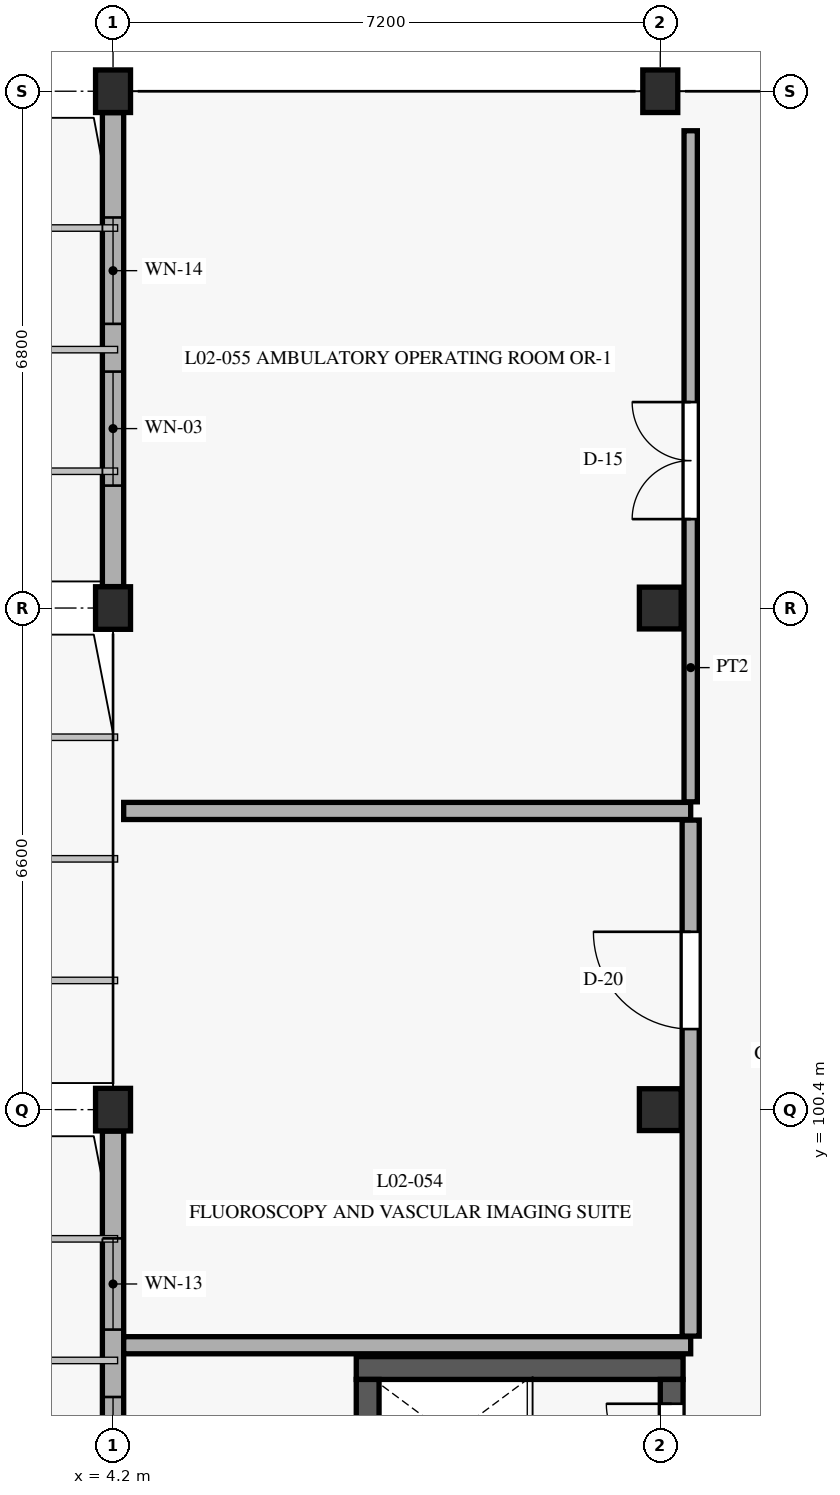
"""IFC4 building model, lengths in metres.
Left out: names, types, materials, properties, quantities, classifications, styles, units other than length and angle.
Written with IfcOpenShell. Run it as: python <this file> out.ifc"""

import sys

from ifc_helpers import new_model, si_unit, direction, frame, frame_2d, origin, origin_with_axes, origin_2d, place, context, subcontext, project, spatial, rectangle, extrude, element, fill, save


model = new_model("IFC4")
c1 = context("Model", 3, precision=1e-05, world=origin(), true_north=direction((0.0, 1.0)))
c2 = subcontext(c1, "Body", "Model", "MODEL_VIEW")
j1 = project(units=[si_unit("LENGTHUNIT", "METRE"), si_unit("PLANEANGLEUNIT", "RADIAN")], contexts=[c1])
p1 = place(None, origin())
s1 = spatial("IfcSite", under=j1, at=p1, CompositionType="ELEMENT")
p2 = place(p1, origin())
s2 = spatial("IfcBuilding", under=s1, at=p2, CompositionType="ELEMENT")
p3 = place(p2, frame((0.0, 0.0, 4.8)))
s3 = spatial("IfcBuildingStorey", under=s2, at=p3, CompositionType="ELEMENT", Elevation=4.8)
for number, where, z_axis, x_axis in (
    (1, (4.2, 100.4, 0.0), (0.0, 0.0, 1.0), (1.0, 0.0, 0.0)),
    (2, (4.2, 107.0, 0.0), (0.0, 0.0, 1.0), (1.0, 0.0, 0.0)),
    (3, (4.2, 113.8, 0.0), (0.0, 0.0, 1.0), (1.0, 0.0, 0.0)),
):
    element("IfcColumn", number, at=place(p3, frame(where, z_axis=z_axis, x_axis=x_axis)), inside=s3, PredefinedType="COLUMN", context=c2, shape_type="SweptSolid", body=[
        extrude(rectangle(XDim=0.46, YDim=0.56, at=origin_2d()), origin(), (0.0, 0.0, 1.0), 4.5),
    ])
for number, where, z_axis, x_axis in (
    (4, (11.4, 100.4, 0.0), (0.0, 0.0, 1.0), (1.0, 0.0, 0.0)),
    (5, (11.4, 107.0, 0.0), (0.0, 0.0, 1.0), (1.0, 0.0, 0.0)),
):
    element("IfcColumn", number, at=place(p3, frame(where, z_axis=z_axis, x_axis=x_axis)), inside=s3, PredefinedType="COLUMN", context=c2, shape_type="SweptSolid", body=[
        extrude(rectangle(XDim=0.55, YDim=0.55, at=origin_2d()), origin(), (0.0, 0.0, 1.0), 4.5),
    ])
p4 = place(p3, frame((11.4, 113.8, 0.0), z_axis=(0.0, 0.0, 1.0), x_axis=(1.0, 0.0, 0.0)))
e6 = element("IfcColumn", 6, at=p4, inside=s3, PredefinedType="COLUMN", context=c2, shape_type="SweptSolid", body=[
    extrude(rectangle(XDim=0.46, YDim=0.56, at=origin_2d()), origin(), (0.0, 0.0, 1.0), 4.5),
])
p5 = place(p3, frame((11.7, 97.0, 0.0), z_axis=(0.0, 0.0, 1.0), x_axis=(-1.0, 0.0, 0.0)))
e7 = element("IfcWall", 7, at=p5, inside=s3, PredefinedType="SHEAR", context=c2, shape_type="SweptSolid", body=[
    extrude(rectangle(XDim=4.3, YDim=0.3, at=frame_2d((2.15, 0.0))), origin(), (0.0, 0.0, 1.0), 4.2),
])
p6 = place(p3, frame((7.55, 96.85, 0.0), z_axis=(0.0, 0.0, 1.0), x_axis=(0.0, -1.0, 0.0)))
e8 = element("IfcWall", 8, at=p6, inside=s3, PredefinedType="SHEAR", context=c2, shape_type="SweptSolid", body=[
    extrude(rectangle(XDim=8.7, YDim=0.3, at=frame_2d((4.35, 0.0))), origin(), (0.0, 0.0, 1.0), 4.2),
])
p7 = place(p3, frame((11.55, 88.15, 0.0), z_axis=(0.0, 0.0, 1.0), x_axis=(0.0, 1.0, 0.0)))
e9 = element("IfcWall", 9, at=p7, inside=s3, PredefinedType="SHEAR", context=c2, shape_type="SweptSolid", body=[
    extrude(rectangle(XDim=8.7, YDim=0.3, at=frame_2d((4.35, 0.0))), origin(), (0.0, 0.0, 1.0), 4.2),
])
p8 = place(p7, frame((0.2, 0.0, 0.0)))
e10 = element("IfcOpeningElement", 10, at=p8, cuts=e9, PredefinedType="OPENING", context=c2, shape_type="SweptSolid", body=[
    extrude(rectangle(XDim=1.1, YDim=2.2, at=frame_2d((0.55, 1.1))), frame((0.0, 0.16, 0.0), z_axis=(0.0, -1.0, 0.0), x_axis=(1.0, 0.0, 0.0)), (0.0, 0.0, 1.0), 0.32),
])
p9 = place(p7, frame((7.52, 0.0, 0.0)))
e11 = element("IfcOpeningElement", 11, at=p9, cuts=e9, PredefinedType="OPENING", context=c2, shape_type="SweptSolid", body=[
    extrude(rectangle(XDim=0.86, YDim=2.05, at=frame_2d((0.43, 1.025))), frame((0.0, 0.16, 0.0), z_axis=(0.0, -1.0, 0.0), x_axis=(1.0, 0.0, 0.0)), (0.0, 0.0, 1.0), 0.32),
])
p10 = place(p3, frame((4.2, 100.118, 0.0), z_axis=(0.0, 0.0, 1.0), x_axis=(0.0, -1.0, 0.0)))
e12 = element("IfcWall", 12, at=p10, inside=s3, PredefinedType="SOLIDWALL", context=c2, shape_type="SweptSolid", body=[
    extrude(rectangle(XDim=6.036, YDim=0.28, at=frame_2d((3.018, 0.0))), origin(), (0.0, 0.0, 1.0), 3.65),
])
p11 = place(p10, frame((1.412, 0.0, 0.88)))
e13 = element("IfcOpeningElement", 13, at=p11, cuts=e12, PredefinedType="OPENING", context=c2, shape_type="SweptSolid", body=[
    extrude(rectangle(XDim=1.2, YDim=2.05, at=frame_2d((0.6, 1.025))), frame((0.0, 0.15, 0.0), z_axis=(0.0, -1.0, 0.0), x_axis=(1.0, 0.0, 0.0)), (0.0, 0.0, 1.0), 0.3),
])
p12 = place(p10, frame((3.499, 0.0, 0.88)))
e14 = element("IfcOpeningElement", 14, at=p12, cuts=e12, PredefinedType="OPENING", context=c2, shape_type="SweptSolid", body=[
    extrude(rectangle(XDim=1.05, YDim=2.2, at=frame_2d((0.525, 1.1))), frame((0.0, 0.15, 0.0), z_axis=(0.0, -1.0, 0.0), x_axis=(1.0, 0.0, 0.0)), (0.0, 0.0, 1.0), 0.3),
])
p13 = place(p3, frame((4.2, 113.518, 0.0), z_axis=(0.0, 0.0, 1.0), x_axis=(0.0, -1.0, 0.0)))
e15 = element("IfcWall", 15, at=p13, inside=s3, PredefinedType="SOLIDWALL", context=c2, shape_type="SweptSolid", body=[
    extrude(rectangle(XDim=6.236, YDim=0.28, at=frame_2d((3.118, 0.0))), origin(), (0.0, 0.0, 1.0), 3.65),
])
p14 = place(p13, frame((1.379, 0.0, 0.88)))
e16 = element("IfcOpeningElement", 16, at=p14, cuts=e15, PredefinedType="OPENING", context=c2, shape_type="SweptSolid", body=[
    extrude(rectangle(XDim=1.4, YDim=2.05, at=frame_2d((0.7, 1.025))), frame((0.0, 0.15, 0.0), z_axis=(0.0, -1.0, 0.0), x_axis=(1.0, 0.0, 0.0)), (0.0, 0.0, 1.0), 0.3),
])
p15 = place(p13, frame((3.407, 0.0, 0.88)))
e17 = element("IfcOpeningElement", 17, at=p15, cuts=e15, PredefinedType="OPENING", context=c2, shape_type="SweptSolid", body=[
    extrude(rectangle(XDim=1.5, YDim=2.2, at=frame_2d((0.75, 1.1))), frame((0.0, 0.15, 0.0), z_axis=(0.0, -1.0, 0.0), x_axis=(1.0, 0.0, 0.0)), (0.0, 0.0, 1.0), 0.3),
])
p16 = place(p3, frame((11.8, 97.42, 0.0), z_axis=(0.0, 0.0, 1.0), x_axis=(0.0, 1.0, 0.0)))
e18 = element("IfcWall", 18, at=p16, inside=s3, PredefinedType="SOLIDWALL", context=c2, shape_type="SweptSolid", body=[
    extrude(rectangle(XDim=6.79, YDim=0.225, at=frame_2d((3.395, 0.0))), origin(), (0.0, 0.0, 1.0), 3.795),
])
p17 = place(p16, frame((4.04, 0.0, 0.0)))
e19 = element("IfcOpeningElement", 19, at=p17, cuts=e18, PredefinedType="OPENING", context=c2, shape_type="SweptSolid", body=[
    extrude(rectangle(XDim=1.28, YDim=2.25, at=frame_2d((0.64, 1.125))), frame((0.0, 0.123, 0.0), z_axis=(0.0, -1.0, 0.0), x_axis=(1.0, 0.0, 0.0)), (0.0, 0.0, 1.0), 0.245),
])
for number, where, z_axis, x_axis in (
    (20, (4.34, 104.33, 0.0), (0.0, 0.0, 1.0), (1.0, 0.0, 0.0)),
    (21, (4.34, 97.3, 0.0), (0.0, 0.0, 1.0), (1.0, 0.0, 0.0)),
):
    element("IfcWall", number, at=place(p3, frame(where, z_axis=z_axis, x_axis=x_axis)), inside=s3, PredefinedType="SOLIDWALL", context=c2, shape_type="SweptSolid", body=[
        extrude(rectangle(XDim=7.46, YDim=0.225, at=frame_2d((3.73, 0.0))), origin(), (0.0, 0.0, 1.0), 3.645),
    ])
p18 = place(p3, frame((11.8, 104.45, 0.0), z_axis=(0.0, 0.0, 1.0), x_axis=(0.0, 1.0, 0.0)))
e22 = element("IfcWall", 22, at=p18, inside=s3, PredefinedType="PARTITIONING", context=c2, shape_type="SweptSolid", body=[
    extrude(rectangle(XDim=8.83, YDim=0.175, at=frame_2d((4.415, 0.0))), origin(), (0.0, 0.0, 1.0), 3.795),
])
p19 = place(p18, frame((3.72, 0.0, 0.0)))
e23 = element("IfcOpeningElement", 23, at=p19, cuts=e22, PredefinedType="OPENING", context=c2, shape_type="SweptSolid", body=[
    extrude(rectangle(XDim=1.54, YDim=2.35, at=frame_2d((0.77, 1.175))), frame((0.0, 0.098, 0.0), z_axis=(0.0, -1.0, 0.0), x_axis=(1.0, 0.0, 0.0)), (0.0, 0.0, 1.0), 0.195),
])
p20 = place(p9, origin_with_axes())
e24 = element("IfcDoor", 24, at=p20, inside=s3, OperationType="SINGLE_SWING_RIGHT", PredefinedType="DOOR", context=c2, shape_type="SweptSolid", body=[
    extrude(rectangle(XDim=0.86, YDim=2.05, at=frame_2d((0.43, 1.025))), frame((0.0, 0.025, 0.0), z_axis=(0.0, -1.0, 0.0), x_axis=(1.0, 0.0, 0.0)), (0.0, 0.0, 1.0), 0.05),
])
fill(e11, e24)
p21 = place(p11, origin_with_axes())
e25 = element("IfcWindow", 25, at=p21, inside=s3, PartitioningType="SINGLE_PANEL", PredefinedType="WINDOW", context=c2, shape_type="SweptSolid", body=[
    extrude(rectangle(XDim=1.2, YDim=2.05, at=frame_2d((0.6, 1.025))), frame((0.0, 0.03, 0.0), z_axis=(0.0, -1.0, 0.0), x_axis=(1.0, 0.0, 0.0)), (0.0, 0.0, 1.0), 0.06),
])
fill(e13, e25)
p22 = place(p12, origin_with_axes())
e26 = element("IfcWindow", 26, at=p22, inside=s3, PartitioningType="SINGLE_PANEL", PredefinedType="WINDOW", context=c2, shape_type="SweptSolid", body=[
    extrude(rectangle(XDim=1.05, YDim=2.2, at=frame_2d((0.525, 1.1))), frame((0.0, 0.03, 0.0), z_axis=(0.0, -1.0, 0.0), x_axis=(1.0, 0.0, 0.0)), (0.0, 0.0, 1.0), 0.06),
])
fill(e14, e26)
p23 = place(p14, origin_with_axes())
e27 = element("IfcWindow", 27, at=p23, inside=s3, PartitioningType="SINGLE_PANEL", PredefinedType="WINDOW", context=c2, shape_type="SweptSolid", body=[
    extrude(rectangle(XDim=1.4, YDim=2.05, at=frame_2d((0.7, 1.025))), frame((0.0, 0.03, 0.0), z_axis=(0.0, -1.0, 0.0), x_axis=(1.0, 0.0, 0.0)), (0.0, 0.0, 1.0), 0.06),
])
fill(e16, e27)
p24 = place(p15, origin_with_axes())
e28 = element("IfcWindow", 28, at=p24, inside=s3, PartitioningType="SINGLE_PANEL", PredefinedType="WINDOW", context=c2, shape_type="SweptSolid", body=[
    extrude(rectangle(XDim=1.5, YDim=2.2, at=frame_2d((0.75, 1.1))), frame((0.0, 0.03, 0.0), z_axis=(0.0, -1.0, 0.0), x_axis=(1.0, 0.0, 0.0)), (0.0, 0.0, 1.0), 0.06),
])
fill(e17, e28)
p25 = place(p17, origin_with_axes())
e29 = element("IfcDoor", 29, at=p25, inside=s3, OperationType="SINGLE_SWING_RIGHT", PredefinedType="DOOR", context=c2, shape_type="SweptSolid", body=[
    extrude(rectangle(XDim=1.28, YDim=2.25, at=frame_2d((0.64, 1.125))), frame((0.0, 0.025, 0.0), z_axis=(0.0, -1.0, 0.0), x_axis=(1.0, 0.0, 0.0)), (0.0, 0.0, 1.0), 0.05),
])
fill(e19, e29)
p26 = place(p19, origin_with_axes())
e30 = element("IfcDoor", 30, at=p26, inside=s3, OperationType="DOUBLE_DOOR_SINGLE_SWING", PredefinedType="DOOR", context=c2, shape_type="SweptSolid", body=[
    extrude(rectangle(XDim=1.54, YDim=2.35, at=frame_2d((0.77, 1.175))), frame((0.0, 0.025, 0.0), z_axis=(0.0, -1.0, 0.0), x_axis=(1.0, 0.0, 0.0)), (0.0, 0.0, 1.0), 0.05),
])
fill(e23, e30)
save(model, sys.argv[1])
